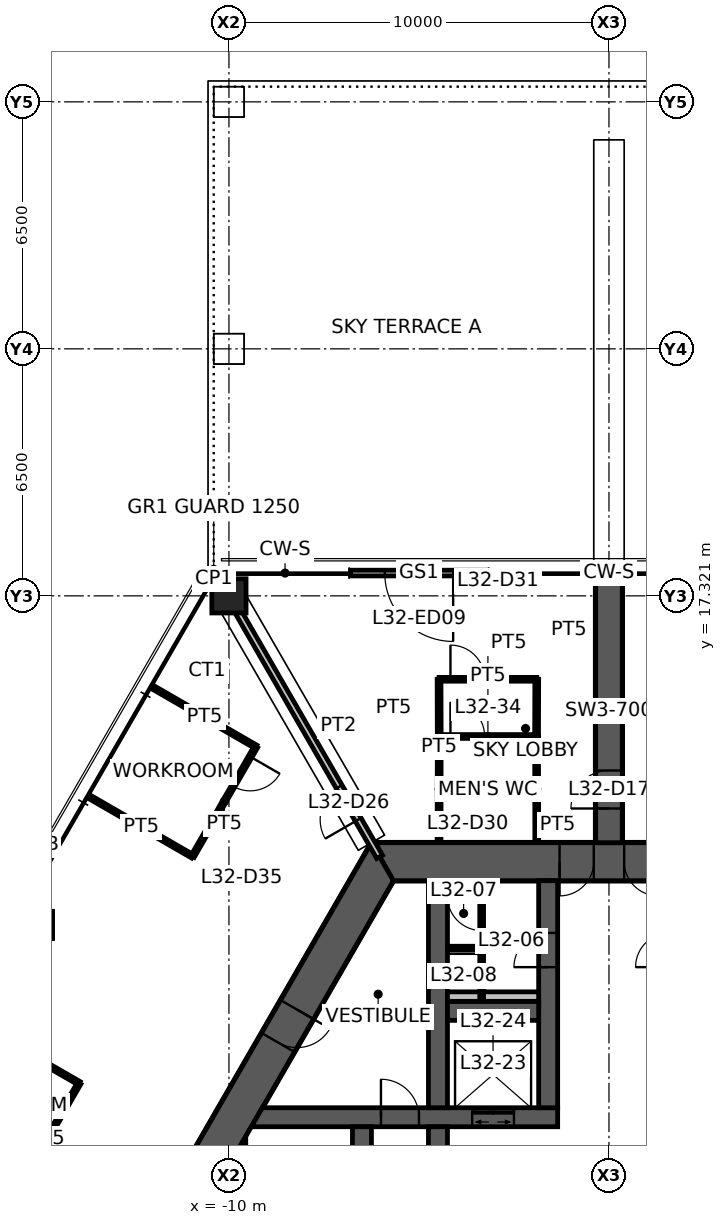
"""IFC4 building model, lengths in metres.
Left out: names, types, materials, properties, quantities, classifications, styles, units other than length and angle.
Written with IfcOpenShell. Run it as: python <this file> out.ifc"""

import sys

from ifc_helpers import new_model, si_unit, direction, frame, frame_2d, origin, origin_2d, place, context, subcontext, project, spatial, polyline, rectangle, hollow_rectangle, outline, extrude, element, fill, save


model = new_model("IFC4")
c1 = context("Model", 3, precision=1e-05, world=origin(), true_north=direction((0.0, 1.0)))
c2 = subcontext(c1, "Body", "Model", "MODEL_VIEW")
j1 = project(units=[si_unit("LENGTHUNIT", "METRE"), si_unit("PLANEANGLEUNIT", "RADIAN")], contexts=[c1])
p1 = place(None, origin())
s1 = spatial("IfcSite", under=j1, at=p1, CompositionType="ELEMENT")
p2 = place(p1, origin())
s2 = spatial("IfcBuilding", under=s1, at=p2, CompositionType="ELEMENT")
p3 = place(p2, frame((0.0, 0.0, 128.6)))
s3 = spatial("IfcBuildingStorey", under=s2, at=p3, CompositionType="ELEMENT", Elevation=128.6)
p4 = place(p3, frame((-10.0, 17.321, 0.0), z_axis=(0.0, 0.0, 1.0), x_axis=(1.0, 0.0, 0.0)))
e1 = element("IfcColumn", 1, at=p4, inside=s3, PredefinedType="COLUMN", context=c2, shape_type="SweptSolid", body=[
    extrude(hollow_rectangle(XDim=0.9, YDim=0.9, WallThickness=0.07, at=origin_2d()), origin(), (0.0, 0.0, 1.0), 4.5),
])
p5 = place(p3, frame((5.961, 10.325, 0.0), z_axis=(0.0, 0.0, 1.0), x_axis=(-1.0, 0.0, 0.0)))
e2 = element("IfcWall", 2, at=p5, inside=s3, PredefinedType="SHEAR", context=c2, shape_type="SweptSolid", body=[
    extrude(outline(polyline([(-0.289, -0.5), (4.661, -0.5), (5.561, -0.5), (6.361, -0.5), (7.261, -0.5), (12.211, -0.5), (11.634, 0.5), (7.261, 0.5), (6.361, 0.5), (5.561, 0.5), (4.661, 0.5), (0.289, 0.5), (-0.289, -0.5)])), origin(), (0.0, 0.0, 1.0), 4.5),
])
p6 = place(p5, frame((6.361, 0.0, 0.0)))
e3 = element("IfcOpeningElement", 3, at=p6, cuts=e2, PredefinedType="OPENING", context=c2, shape_type="SweptSolid", body=[
    extrude(rectangle(XDim=0.9, YDim=2.1, at=frame_2d((0.45, 1.05))), frame((0.0, 0.51, 0.0), z_axis=(0.0, -1.0, 0.0), x_axis=(1.0, 0.0, 0.0)), (0.0, 0.0, 1.0), 1.02),
])
p7 = place(p5, frame((4.661, 0.0, 0.0)))
e4 = element("IfcOpeningElement", 4, at=p7, cuts=e2, PredefinedType="OPENING", context=c2, shape_type="SweptSolid", body=[
    extrude(rectangle(XDim=0.9, YDim=2.1, at=frame_2d((0.45, 1.05))), frame((0.0, 0.51, 0.0), z_axis=(0.0, -1.0, 0.0), x_axis=(1.0, 0.0, 0.0)), (0.0, 0.0, 1.0), 1.02),
])
p8 = place(p3, frame((-5.961, 10.325, 0.0), z_axis=(0.0, 0.0, 1.0), x_axis=(-0.500004296715, -0.866022923061, 0.0)))
e5 = element("IfcWall", 5, at=p8, inside=s3, PredefinedType="SHEAR", context=c2, shape_type="SweptSolid", body=[
    extrude(outline(polyline([(-0.289, -0.5), (4.494, -0.5), (5.494, -0.5), (12.211, -0.5), (11.634, 0.5), (5.494, 0.5), (4.494, 0.5), (0.289, 0.5), (-0.289, -0.5)])), origin(), (0.0, 0.0, 1.0), 4.5),
])
p9 = place(p8, frame((4.494, 0.0, 0.0)))
e6 = element("IfcOpeningElement", 6, at=p9, cuts=e5, PredefinedType="OPENING", context=c2, shape_type="SweptSolid", body=[
    extrude(rectangle(XDim=1.0, YDim=2.1, at=frame_2d((0.5, 1.05))), frame((0.0, 0.51, 0.0), z_axis=(0.0, -1.0, 0.0), x_axis=(1.0, 0.0, 0.0)), (0.0, 0.0, 1.0), 1.02),
])
p10 = place(p3, frame((0.0, 10.825, 0.0), z_axis=(0.0, 0.0, 1.0), x_axis=(0.0, 1.0, 0.0)))
e7 = element("IfcWall", 7, at=p10, inside=s3, PredefinedType="SHEAR", context=c2, shape_type="SweptSolid", body=[
    extrude(rectangle(XDim=6.946, YDim=0.7, at=frame_2d((3.473, 0.0))), origin(), (0.0, 0.0, 1.0), 4.5),
])
p11 = place(p10, frame((0.9, 0.0, 0.0)))
e8 = element("IfcOpeningElement", 8, at=p11, cuts=e7, PredefinedType="OPENING", context=c2, shape_type="SweptSolid", body=[
    extrude(rectangle(XDim=1.0, YDim=2.1, at=frame_2d((0.5, 1.05))), frame((0.0, 0.36, 0.0), z_axis=(0.0, -1.0, 0.0), x_axis=(1.0, 0.0, 0.0)), (0.0, 0.0, 1.0), 0.72),
])
p12 = place(p3, frame((-3.2, 17.92, 0.0), z_axis=(0.0, 0.0, 1.0), x_axis=(-1.0, 0.0, 0.0)))
e9 = element("IfcWall", 9, at=p12, inside=s3, PredefinedType="STANDARD", context=c2, shape_type="SweptSolid", body=[
    extrude(rectangle(XDim=3.6, YDim=0.15, at=frame_2d((1.8, 0.0))), origin(), (0.0, 0.0, 1.0), 4.5),
])
p13 = place(p12, frame((0.9, 0.0, 0.0)))
e10 = element("IfcOpeningElement", 10, at=p13, cuts=e9, PredefinedType="OPENING", context=c2, shape_type="SweptSolid", body=[
    extrude(rectangle(XDim=1.8, YDim=2.1, at=frame_2d((0.9, 1.05))), frame((0.0, 0.085, 0.0), z_axis=(0.0, -1.0, 0.0), x_axis=(1.0, 0.0, 0.0)), (0.0, 0.0, 1.0), 0.17),
])
p14 = place(p3, frame((-9.266, 3.6, 0.0), z_axis=(0.0, 0.0, 1.0), x_axis=(1.0, 0.0, 0.0)))
e11 = element("IfcWall", 11, at=p14, inside=s3, PredefinedType="SHEAR", context=c2, shape_type="SweptSolid", body=[
    extrude(outline(polyline([(-0.144, -0.25), (3.266, -0.25), (4.266, -0.25), (5.667, -0.25), (6.767, -0.25), (7.916, -0.25), (7.916, 0.25), (6.767, 0.25), (5.667, 0.25), (4.266, 0.25), (3.266, 0.25), (0.144, 0.25), (-0.144, -0.25)])), origin(), (0.0, 0.0, 1.0), 4.5),
])
p15 = place(p14, frame((3.266, 0.0, 0.0)))
e12 = element("IfcOpeningElement", 12, at=p15, cuts=e11, PredefinedType="OPENING", context=c2, shape_type="SweptSolid", body=[
    extrude(rectangle(XDim=1.0, YDim=2.1, at=frame_2d((0.5, 1.05))), frame((0.0, 0.26, 0.0), z_axis=(0.0, -1.0, 0.0), x_axis=(1.0, 0.0, 0.0)), (0.0, 0.0, 1.0), 0.52),
])
p16 = place(p14, frame((5.667, 0.0, 0.0)))
e13 = element("IfcOpeningElement", 13, at=p16, cuts=e11, PredefinedType="OPENING", context=c2, shape_type="SweptSolid", body=[
    extrude(rectangle(XDim=1.1, YDim=2.1, at=frame_2d((0.55, 1.05))), frame((0.0, 0.26, 0.0), z_axis=(0.0, -1.0, 0.0), x_axis=(1.0, 0.0, 0.0)), (0.0, 0.0, 1.0), 0.52),
])
p17 = place(p3, frame((-1.6, 3.85, 0.0), z_axis=(0.0, 0.0, 1.0), x_axis=(0.0, 1.0, 0.0)))
e14 = element("IfcWall", 14, at=p17, inside=s3, PredefinedType="SHEAR", context=c2, shape_type="SweptSolid", body=[
    extrude(rectangle(XDim=5.975, YDim=0.5, at=frame_2d((2.987, 0.0))), origin(), (0.0, 0.0, 1.0), 4.5),
])
p18 = place(p17, frame((3.7, 0.0, 0.0)))
e15 = element("IfcOpeningElement", 15, at=p18, cuts=e14, PredefinedType="OPENING", context=c2, shape_type="SweptSolid", body=[
    extrude(rectangle(XDim=0.9, YDim=2.1, at=frame_2d((0.45, 1.05))), frame((0.0, 0.26, 0.0), z_axis=(0.0, -1.0, 0.0), x_axis=(1.0, 0.0, 0.0)), (0.0, 0.0, 1.0), 0.52),
])
p19 = place(p3, frame((-4.5, -3.35, 0.0), z_axis=(0.0, 0.0, 1.0), x_axis=(0.0, 1.0, 0.0)))
e16 = element("IfcWall", 16, at=p19, inside=s3, PredefinedType="SHEAR", context=c2, shape_type="SweptSolid", body=[
    extrude(rectangle(XDim=6.7, YDim=0.5, at=frame_2d((3.35, 0.0))), origin(), (0.0, 0.0, 1.0), 4.5),
])
p20 = place(p19, frame((2.85, 0.0, 0.0)))
e17 = element("IfcOpeningElement", 17, at=p20, cuts=e16, PredefinedType="OPENING", context=c2, shape_type="SweptSolid", body=[
    extrude(rectangle(XDim=1.0, YDim=2.1, at=frame_2d((0.5, 1.05))), frame((0.0, 0.26, 0.0), z_axis=(0.0, -1.0, 0.0), x_axis=(1.0, 0.0, 0.0)), (0.0, 0.0, 1.0), 0.52),
])
p21 = place(p3, frame((-6.5, -3.35, 0.0), z_axis=(0.0, 0.0, 1.0), x_axis=(0.0, 1.0, 0.0)))
e18 = element("IfcWall", 18, at=p21, inside=s3, PredefinedType="SHEAR", context=c2, shape_type="SweptSolid", body=[
    extrude(rectangle(XDim=6.7, YDim=0.5, at=frame_2d((3.35, 0.0))), origin(), (0.0, 0.0, 1.0), 4.5),
])
p22 = place(p21, frame((0.1, 0.0, 0.0)))
e19 = element("IfcOpeningElement", 19, at=p22, cuts=e18, PredefinedType="OPENING", context=c2, shape_type="SweptSolid", body=[
    extrude(rectangle(XDim=1.0, YDim=2.1, at=frame_2d((0.5, 1.05))), frame((0.0, 0.26, 0.0), z_axis=(0.0, -1.0, 0.0), x_axis=(1.0, 0.0, 0.0)), (0.0, 0.0, 1.0), 0.52),
])
p23 = place(p3, frame((-4.5, 3.85, 0.0), z_axis=(0.0, 0.0, 1.0), x_axis=(0.0, 1.0, 0.0)))
e20 = element("IfcWall", 20, at=p23, inside=s3, PredefinedType="SHEAR", context=c2, shape_type="SweptSolid", body=[
    extrude(rectangle(XDim=5.975, YDim=0.5, at=frame_2d((2.987, 0.0))), origin(), (0.0, 0.0, 1.0), 4.5),
])
p24 = place(p3, frame((-4.25, 6.4, 0.0), z_axis=(0.0, 0.0, 1.0), x_axis=(1.0, 0.0, 0.0)))
e21 = element("IfcWall", 21, at=p24, inside=s3, PredefinedType="SHEAR", context=c2, shape_type="SweptSolid", body=[
    extrude(rectangle(XDim=2.4, YDim=0.5, at=frame_2d((1.2, 0.0))), origin(), (0.0, 0.0, 1.0), 4.5),
])
p25 = place(p3, frame((-9.808, -2.662, 0.0), z_axis=(0.0, 0.0, 1.0), x_axis=(0.0, 1.0, 0.0)))
e22 = element("IfcWall", 22, at=p25, inside=s3, PredefinedType="SHEAR", context=c2, shape_type="SweptSolid", body=[
    extrude(outline(polyline([(-0.433, -0.25), (5.758, -0.25), (4.892, 0.25), (0.433, 0.25), (-0.433, -0.25)])), origin(), (0.0, 0.0, 1.0), 4.5),
])
p26 = place(p3, frame((-4.25, 6.775, 0.0), z_axis=(0.0, 0.0, 1.0), x_axis=(1.0, 0.0, 0.0)))
e23 = element("IfcWall", 23, at=p26, inside=s3, PredefinedType="PLUMBINGWALL", context=c2, shape_type="SweptSolid", body=[
    extrude(rectangle(XDim=2.4, YDim=0.25, at=frame_2d((1.2, 0.0))), origin(), (0.0, 0.0, 1.0), 4.5),
])
p27 = place(p3, frame((-3.35, 6.65, 0.0), z_axis=(0.0, 0.0, 1.0), x_axis=(0.0, 1.0, 0.0)))
e24 = element("IfcWall", 24, at=p27, inside=s3, PredefinedType="PARTITIONING", context=c2, shape_type="SweptSolid", body=[
    extrude(rectangle(XDim=3.175, YDim=0.1, at=frame_2d((1.587, 0.0))), origin(), (0.0, 0.0, 1.0), 3.55),
])
p28 = place(p27, frame((1.863, 0.0, 0.0)))
e25 = element("IfcOpeningElement", 25, at=p28, cuts=e24, PredefinedType="OPENING", context=c2, shape_type="SweptSolid", body=[
    extrude(rectangle(XDim=0.9, YDim=2.1, at=frame_2d((0.45, 1.05))), frame((0.0, 0.06, 0.0), z_axis=(0.0, -1.0, 0.0), x_axis=(1.0, 0.0, 0.0)), (0.0, 0.0, 1.0), 0.12),
])
p29 = place(p27, frame((0.35, 0.0, 0.0)))
e26 = element("IfcOpeningElement", 26, at=p29, cuts=e24, PredefinedType="OPENING", context=c2, shape_type="SweptSolid", body=[
    extrude(rectangle(XDim=0.9, YDim=2.1, at=frame_2d((0.45, 1.05))), frame((0.0, 0.06, 0.0), z_axis=(0.0, -1.0, 0.0), x_axis=(1.0, 0.0, 0.0)), (0.0, 0.0, 1.0), 0.12),
])
p30 = place(p3, frame((-3.4, 8.05, 0.0), z_axis=(0.0, 0.0, 1.0), x_axis=(-1.0, 0.0, 0.0)))
e27 = element("IfcWall", 27, at=p30, inside=s3, PredefinedType="PARTITIONING", context=c2, shape_type="SweptSolid", body=[
    extrude(rectangle(XDim=0.85, YDim=0.1, at=frame_2d((0.425, 0.0))), origin(), (0.0, 0.0, 1.0), 3.55),
])
p31 = place(p3, frame((-6.035, 10.453, 0.0), z_axis=(0.0, 0.0, 1.0), x_axis=(-0.499989830942, 0.866031274813, 0.0)))
e28 = element("IfcWall", 28, at=p31, inside=s3, PredefinedType="PARTITIONING", context=c2, shape_type="SweptSolid", body=[
    extrude(rectangle(XDim=7.93, YDim=0.175, at=frame_2d((3.965, 0.0))), origin(), (0.0, 0.0, 1.0), 3.65),
])
p32 = place(p31, frame((1.13, 0.0, 0.0)))
e29 = element("IfcOpeningElement", 29, at=p32, cuts=e28, PredefinedType="OPENING", context=c2, shape_type="SweptSolid", body=[
    extrude(rectangle(XDim=1.0, YDim=2.1, at=frame_2d((0.5, 1.05))), frame((0.0, 0.098, 0.0), z_axis=(0.0, -1.0, 0.0), x_axis=(1.0, 0.0, 0.0)), (0.0, 0.0, 1.0), 0.195),
])
p33 = place(p3, frame((-4.471, 13.62, 0.0), z_axis=(0.0, 0.0, 1.0), x_axis=(1.0, 0.0, 0.0)))
e30 = element("IfcWall", 30, at=p33, inside=s3, PredefinedType="PARTITIONING", context=c2, shape_type="SweptSolid", body=[
    extrude(rectangle(XDim=2.571, YDim=0.1, at=frame_2d((1.286, 0.0))), origin(), (0.0, 0.0, 1.0), 3.55),
])
p34 = place(p33, frame((0.3, 0.0, 0.0)))
e31 = element("IfcOpeningElement", 31, at=p34, cuts=e30, PredefinedType="OPENING", context=c2, shape_type="SweptSolid", body=[
    extrude(rectangle(XDim=0.9, YDim=2.1, at=frame_2d((0.45, 1.05))), frame((0.0, 0.06, 0.0), z_axis=(0.0, -1.0, 0.0), x_axis=(1.0, 0.0, 0.0)), (0.0, 0.0, 1.0), 0.12),
])
for number, where, z_axis, x_axis in (
    (32, (-4.471, 10.845, 0.0), (0.0, 0.0, 1.0), (0.002, 1.0, 0.0)),
    (33, (-1.905, 13.625, 0.0), (0.0, 0.0, 1.0), (0.002, -1.0, 0.0)),
):
    element("IfcWall", number, at=place(p3, frame(where, z_axis=z_axis, x_axis=x_axis)), inside=s3, PredefinedType="PARTITIONING", context=c2, shape_type="SweptSolid", body=[
        extrude(rectangle(XDim=2.78, YDim=0.1, at=frame_2d((1.39, 0.0))), origin(), (0.0, 0.0, 1.0), 3.55),
    ])
p35 = place(p3, frame((-4.471, 15.125, 0.0), z_axis=(0.0, 0.0, 1.0), x_axis=(1.0, 0.0, 0.0)))
e34 = element("IfcWall", 34, at=p35, inside=s3, PredefinedType="PARTITIONING", context=c2, shape_type="SweptSolid", body=[
    extrude(rectangle(XDim=2.571, YDim=0.1, at=frame_2d((1.286, 0.0))), origin(), (0.0, 0.0, 1.0), 3.55),
])
p36 = place(p35, frame((0.3, 0.0, 0.0)))
e35 = element("IfcOpeningElement", 35, at=p36, cuts=e34, PredefinedType="OPENING", context=c2, shape_type="SweptSolid", body=[
    extrude(rectangle(XDim=0.9, YDim=2.1, at=frame_2d((0.45, 1.05))), frame((0.0, 0.06, 0.0), z_axis=(0.0, -1.0, 0.0), x_axis=(1.0, 0.0, 0.0)), (0.0, 0.0, 1.0), 0.12),
])
for number, where, z_axis, x_axis in (
    (36, (-4.466, 13.625, 0.0), (0.0, 0.0, 1.0), (-0.003, 1.0, 0.0)),
    (37, (-1.9, 15.125, 0.0), (0.0, 0.0, 1.0), (-0.003, -1.0, 0.0)),
):
    element("IfcWall", number, at=place(p3, frame(where, z_axis=z_axis, x_axis=x_axis)), inside=s3, PredefinedType="PARTITIONING", context=c2, shape_type="SweptSolid", body=[
        extrude(rectangle(XDim=1.5, YDim=0.1, at=frame_2d((0.75, 0.0))), origin(), (0.0, 0.0, 1.0), 3.55),
    ])
p37 = place(p3, frame((-16.988, 6.255, 0.0), z_axis=(0.0, 0.0, 1.0), x_axis=(0.866009963213, -0.5000267429, 0.0)))
e38 = element("IfcWall", 38, at=p37, inside=s3, PredefinedType="PARTITIONING", context=c2, shape_type="SweptSolid", body=[
    extrude(rectangle(XDim=3.519, YDim=0.1, at=frame_2d((1.759, 0.0))), origin(), (0.0, 0.0, 1.0), 3.55),
])
p38 = place(p3, frame((-13.941, 4.495, 0.0), z_axis=(0.0, 0.0, 1.0), x_axis=(-0.500003502126, -0.866023381821, 0.0)))
e39 = element("IfcWall", 39, at=p38, inside=s3, PredefinedType="PARTITIONING", context=c2, shape_type="SweptSolid", body=[
    extrude(rectangle(XDim=3.384, YDim=0.1, at=frame_2d((1.692, 0.0))), origin(), (0.0, 0.0, 1.0), 3.55),
])
p39 = place(p3, frame((-11.992, 14.909, 0.0), z_axis=(0.0, 0.0, 1.0), x_axis=(0.866018739521, -0.500011542666, 0.0)))
e40 = element("IfcWall", 40, at=p39, inside=s3, PredefinedType="PARTITIONING", context=c2, shape_type="SweptSolid", body=[
    extrude(rectangle(XDim=3.119, YDim=0.1, at=frame_2d((1.56, 0.0))), origin(), (0.0, 0.0, 1.0), 3.55),
])
p40 = place(p3, frame((-10.956, 10.465, 0.0), z_axis=(0.0, 0.0, 1.0), x_axis=(-0.866052632827, 0.499952834948, 0.0)))
e41 = element("IfcWall", 41, at=p40, inside=s3, PredefinedType="PARTITIONING", context=c2, shape_type="SweptSolid", body=[
    extrude(rectangle(XDim=3.119, YDim=0.1, at=frame_2d((1.56, 0.0))), origin(), (0.0, 0.0, 1.0), 3.55),
])
p41 = place(p3, frame((-9.291, 13.349, 0.0), z_axis=(0.0, 0.0, 1.0), x_axis=(-0.500033344505, -0.86600615147, 0.0)))
e42 = element("IfcWall", 42, at=p41, inside=s3, PredefinedType="PARTITIONING", context=c2, shape_type="SweptSolid", body=[
    extrude(rectangle(XDim=3.331, YDim=0.1, at=frame_2d((1.666, 0.0))), origin(), (0.0, 0.0, 1.0), 3.55),
])
p42 = place(p41, frame((0.3, 0.0, 0.0)))
e43 = element("IfcOpeningElement", 43, at=p42, cuts=e42, PredefinedType="OPENING", context=c2, shape_type="SweptSolid", body=[
    extrude(rectangle(XDim=0.9, YDim=2.1, at=frame_2d((0.45, 1.05))), frame((0.0, 0.06, 0.0), z_axis=(0.0, -1.0, 0.0), x_axis=(1.0, 0.0, 0.0)), (0.0, 0.0, 1.0), 0.12),
])
p43 = place(p3, frame((0.0, 17.771, 0.0), z_axis=(0.0, 0.0, 1.0), x_axis=(0.0, 1.0, 0.0)))
e44 = element("IfcWall", 44, at=p43, inside=s3, PredefinedType="PARTITIONING", context=c2, shape_type="SweptSolid", body=[
    extrude(rectangle(XDim=0.045, YDim=0.175, at=frame_2d((0.022, 0.0))), origin(), (0.0, 0.0, 1.0), 4.5),
])
p44 = place(p13, origin())
e45 = element("IfcDoor", 45, at=p44, inside=s3, OperationType="DOUBLE_DOOR_SINGLE_SWING", PredefinedType="DOOR", context=c2, shape_type="SweptSolid", body=[
    extrude(rectangle(XDim=1.8, YDim=2.1, at=frame_2d((0.9, 1.05))), frame((0.0, 0.025, 0.0), z_axis=(0.0, -1.0, 0.0), x_axis=(1.0, 0.0, 0.0)), (0.0, 0.0, 1.0), 0.05),
])
fill(e10, e45)
p45 = place(p6, origin())
e46 = element("IfcDoor", 46, at=p45, inside=s3, OperationType="SINGLE_SWING_RIGHT", PredefinedType="DOOR", context=c2, shape_type="SweptSolid", body=[
    extrude(rectangle(XDim=0.9, YDim=2.1, at=frame_2d((0.45, 1.05))), frame((0.0, 0.025, 0.0), z_axis=(0.0, -1.0, 0.0), x_axis=(1.0, 0.0, 0.0)), (0.0, 0.0, 1.0), 0.05),
])
fill(e3, e46)
p46 = place(p7, origin())
e47 = element("IfcDoor", 47, at=p46, inside=s3, OperationType="SINGLE_SWING_LEFT", PredefinedType="DOOR", context=c2, shape_type="SweptSolid", body=[
    extrude(rectangle(XDim=0.9, YDim=2.1, at=frame_2d((0.45, 1.05))), frame((0.0, 0.025, 0.0), z_axis=(0.0, -1.0, 0.0), x_axis=(1.0, 0.0, 0.0)), (0.0, 0.0, 1.0), 0.05),
])
fill(e4, e47)
p47 = place(p9, origin())
e48 = element("IfcDoor", 48, at=p47, inside=s3, OperationType="SINGLE_SWING_LEFT", PredefinedType="DOOR", context=c2, shape_type="SweptSolid", body=[
    extrude(rectangle(XDim=1.0, YDim=2.1, at=frame_2d((0.5, 1.05))), frame((0.0, 0.025, 0.0), z_axis=(0.0, -1.0, 0.0), x_axis=(1.0, 0.0, 0.0)), (0.0, 0.0, 1.0), 0.05),
])
fill(e6, e48)
p48 = place(p15, origin())
e49 = element("IfcDoor", 49, at=p48, inside=s3, OperationType="SINGLE_SWING_LEFT", PredefinedType="DOOR", context=c2, shape_type="SweptSolid", body=[
    extrude(rectangle(XDim=1.0, YDim=2.1, at=frame_2d((0.5, 1.05))), frame((0.0, 0.025, 0.0), z_axis=(0.0, -1.0, 0.0), x_axis=(1.0, 0.0, 0.0)), (0.0, 0.0, 1.0), 0.05),
])
fill(e12, e49)
p49 = place(p18, origin())
e50 = element("IfcDoor", 50, at=p49, inside=s3, OperationType="SINGLE_SWING_LEFT", PredefinedType="DOOR", context=c2, shape_type="SweptSolid", body=[
    extrude(rectangle(XDim=0.9, YDim=2.1, at=frame_2d((0.45, 1.05))), frame((0.0, 0.025, 0.0), z_axis=(0.0, -1.0, 0.0), x_axis=(1.0, 0.0, 0.0)), (0.0, 0.0, 1.0), 0.05),
])
fill(e15, e50)
p50 = place(p11, origin())
e51 = element("IfcDoor", 51, at=p50, inside=s3, OperationType="SINGLE_SWING_LEFT", PredefinedType="DOOR", context=c2, shape_type="SweptSolid", body=[
    extrude(rectangle(XDim=1.0, YDim=2.1, at=frame_2d((0.5, 1.05))), frame((0.0, 0.025, 0.0), z_axis=(0.0, -1.0, 0.0), x_axis=(1.0, 0.0, 0.0)), (0.0, 0.0, 1.0), 0.05),
])
fill(e8, e51)
p51 = place(p28, origin())
e52 = element("IfcDoor", 52, at=p51, inside=s3, OperationType="SINGLE_SWING_RIGHT", PredefinedType="DOOR", context=c2, shape_type="SweptSolid", body=[
    extrude(rectangle(XDim=0.9, YDim=2.1, at=frame_2d((0.45, 1.05))), frame((0.0, 0.025, 0.0), z_axis=(0.0, -1.0, 0.0), x_axis=(1.0, 0.0, 0.0)), (0.0, 0.0, 1.0), 0.05),
])
fill(e25, e52)
p52 = place(p29, origin())
e53 = element("IfcDoor", 53, at=p52, inside=s3, OperationType="SINGLE_SWING_RIGHT", PredefinedType="DOOR", context=c2, shape_type="SweptSolid", body=[
    extrude(rectangle(XDim=0.9, YDim=2.1, at=frame_2d((0.45, 1.05))), frame((0.0, 0.025, 0.0), z_axis=(0.0, -1.0, 0.0), x_axis=(1.0, 0.0, 0.0)), (0.0, 0.0, 1.0), 0.05),
])
fill(e26, e53)
p53 = place(p32, origin())
e54 = element("IfcDoor", 54, at=p53, inside=s3, OperationType="SINGLE_SWING_LEFT", PredefinedType="DOOR", context=c2, shape_type="SweptSolid", body=[
    extrude(rectangle(XDim=1.0, YDim=2.1, at=frame_2d((0.5, 1.05))), frame((0.0, 0.025, 0.0), z_axis=(0.0, -1.0, 0.0), x_axis=(1.0, 0.0, 0.0)), (0.0, 0.0, 1.0), 0.05),
])
fill(e29, e54)
p54 = place(p34, origin())
e55 = element("IfcDoor", 55, at=p54, inside=s3, OperationType="SINGLE_SWING_LEFT", PredefinedType="DOOR", context=c2, shape_type="SweptSolid", body=[
    extrude(rectangle(XDim=0.9, YDim=2.1, at=frame_2d((0.45, 1.05))), frame((0.0, 0.025, 0.0), z_axis=(0.0, -1.0, 0.0), x_axis=(1.0, 0.0, 0.0)), (0.0, 0.0, 1.0), 0.05),
])
fill(e31, e55)
p55 = place(p36, origin())
e56 = element("IfcDoor", 56, at=p55, inside=s3, OperationType="SINGLE_SWING_LEFT", PredefinedType="DOOR", context=c2, shape_type="SweptSolid", body=[
    extrude(rectangle(XDim=0.9, YDim=2.1, at=frame_2d((0.45, 1.05))), frame((0.0, 0.025, 0.0), z_axis=(0.0, -1.0, 0.0), x_axis=(1.0, 0.0, 0.0)), (0.0, 0.0, 1.0), 0.05),
])
fill(e35, e56)
p56 = place(p42, origin())
e57 = element("IfcDoor", 57, at=p56, inside=s3, OperationType="SINGLE_SWING_LEFT", PredefinedType="DOOR", context=c2, shape_type="SweptSolid", body=[
    extrude(rectangle(XDim=0.9, YDim=2.1, at=frame_2d((0.45, 1.05))), frame((0.0, 0.025, 0.0), z_axis=(0.0, -1.0, 0.0), x_axis=(1.0, 0.0, 0.0)), (0.0, 0.0, 1.0), 0.05),
])
fill(e43, e57)
p57 = place(p16, origin())
e58 = element("IfcDoor", 58, at=p57, inside=s3, OperationType="DOUBLE_DOOR_SLIDING", PredefinedType="DOOR", context=c2, shape_type="SweptSolid", body=[
    extrude(rectangle(XDim=1.1, YDim=2.1, at=frame_2d((0.55, 1.05))), frame((0.0, 0.025, 0.0), z_axis=(0.0, -1.0, 0.0), x_axis=(1.0, 0.0, 0.0)), (0.0, 0.0, 1.0), 0.05),
])
fill(e13, e58)
save(model, sys.argv[1])
